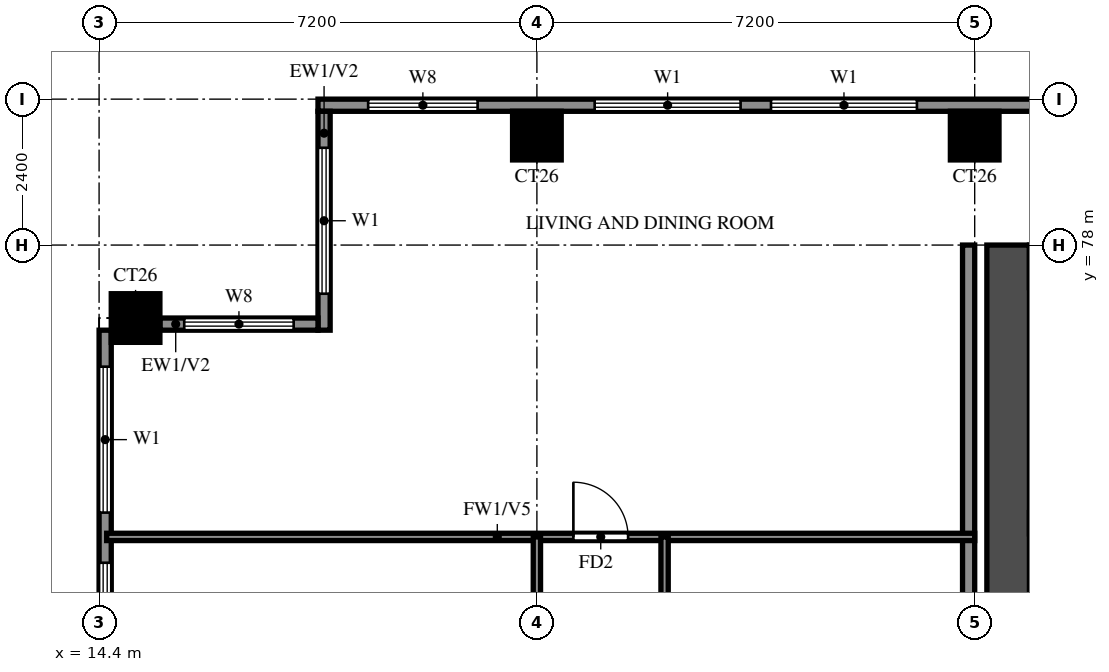
"""IFC4 building model, lengths in metres.
Left out: names, types, materials, properties, quantities, classifications, styles, units other than length and angle.
Written with IfcOpenShell. Run it as: python <this file> out.ifc"""

import sys

from ifc_helpers import new_model, si_unit, direction, frame, frame_2d, origin, origin_2d, place, context, subcontext, project, spatial, rectangle, extrude, source, transform, mapped, element, fill, save


model = new_model("IFC4")
c1 = context("Model", 3, precision=1e-05, world=origin(), true_north=direction((0.0, 1.0)))
c2 = subcontext(c1, "Body", "Model", "MODEL_VIEW")
j1 = project(units=[si_unit("LENGTHUNIT", "METRE"), si_unit("PLANEANGLEUNIT", "RADIAN")], contexts=[c1])
p1 = place(None, origin())
s1 = spatial("IfcSite", under=j1, at=p1, CompositionType="ELEMENT")
p2 = place(p1, origin())
s2 = spatial("IfcBuilding", under=s1, at=p2, CompositionType="ELEMENT")
p3 = place(p2, frame((0.0, 0.0, 188.5)))
s3 = spatial("IfcBuildingStorey", under=s2, at=p3, CompositionType="ELEMENT", Elevation=188.5)
m1 = source(origin(), c2, "Body", "SweptSolid", [
    extrude(rectangle(XDim=0.8, YDim=0.8, at=origin_2d()), origin(), (0.0, 0.0, 1.0), 3.2),
])
for number, where, z_axis, x_axis in (
    (1, (15.0, 76.8, 0.0), (0.0, 0.0, 1.0), (1.0, 0.0, 0.0)),
    (2, (21.6, 79.8, 0.0), (0.0, 0.0, 1.0), (1.0, 0.0, 0.0)),
    (3, (28.8, 79.8, 0.0), (0.0, 0.0, 1.0), (1.0, 0.0, 0.0)),
):
    element("IfcColumn", number, at=place(p3, frame(where, z_axis=z_axis, x_axis=x_axis)), inside=s3, PredefinedType="COLUMN", context=c2, shape_type="MappedRepresentation", body=[
        mapped(m1, transform((0.0, 0.0, 0.0))),
    ])
p4 = place(p3, frame((29.35, 66.1, 0.0), z_axis=(0.0, 0.0, 1.0), x_axis=(0.0, 1.0, 0.0)))
e4 = element("IfcWall", 4, at=p4, inside=s3, PredefinedType="SHEAR", context=c2, shape_type="SweptSolid", body=[
    extrude(rectangle(XDim=11.9, YDim=0.7, at=frame_2d((5.95, 0.0))), origin(), (0.0, 0.0, 1.0), 3.2),
])
p5 = place(p3, frame((72.0, 80.3, 0.0), z_axis=(0.0, 0.0, 1.0), x_axis=(-1.0, 0.0, 0.0)))
e5 = element("IfcWall", 5, at=p5, inside=s3, PredefinedType="SOLIDWALL", context=c2, shape_type="SweptSolid", body=[
    extrude(rectangle(XDim=54.0, YDim=0.2, at=frame_2d((27.0, 0.0))), origin(), (0.0, 0.0, 1.0), 3.2),
])
p6 = place(p5, frame((44.15, 0.0, 0.6)))
e6 = element("IfcOpeningElement", 6, at=p6, cuts=e5, PredefinedType="OPENING", context=c2, shape_type="SweptSolid", body=[
    extrude(rectangle(XDim=2.4, YDim=2.4, at=frame_2d((1.2, 1.2))), frame((0.0, 0.11, 0.0), z_axis=(0.0, -1.0, 0.0), x_axis=(1.0, 0.0, 0.0)), (0.0, 0.0, 1.0), 0.22),
])
p7 = place(p5, frame((47.05, 0.0, 0.6)))
e7 = element("IfcOpeningElement", 7, at=p7, cuts=e5, PredefinedType="OPENING", context=c2, shape_type="SweptSolid", body=[
    extrude(rectangle(XDim=2.4, YDim=2.4, at=frame_2d((1.2, 1.2))), frame((0.0, 0.11, 0.0), z_axis=(0.0, -1.0, 0.0), x_axis=(1.0, 0.0, 0.0)), (0.0, 0.0, 1.0), 0.22),
])
p8 = place(p5, frame((51.375, 0.0, 0.6)))
e8 = element("IfcOpeningElement", 8, at=p8, cuts=e5, PredefinedType="OPENING", context=c2, shape_type="SweptSolid", body=[
    extrude(rectangle(XDim=1.8, YDim=2.4, at=frame_2d((0.9, 1.2))), frame((0.0, 0.11, 0.0), z_axis=(0.0, -1.0, 0.0), x_axis=(1.0, 0.0, 0.0)), (0.0, 0.0, 1.0), 0.22),
])
p9 = place(p3, frame((18.1, 80.2, 0.0), z_axis=(0.0, 0.0, 1.0), x_axis=(0.0, -1.0, 0.0)))
e9 = element("IfcWall", 9, at=p9, inside=s3, PredefinedType="SOLIDWALL", context=c2, shape_type="SweptSolid", body=[
    extrude(rectangle(XDim=3.6, YDim=0.2, at=frame_2d((1.8, 0.0))), origin(), (0.0, 0.0, 1.0), 3.2),
])
p10 = place(p9, frame((0.6, 0.0, 0.6)))
e10 = element("IfcOpeningElement", 10, at=p10, cuts=e9, PredefinedType="OPENING", context=c2, shape_type="SweptSolid", body=[
    extrude(rectangle(XDim=2.4, YDim=2.4, at=frame_2d((1.2, 1.2))), frame((0.0, 0.11, 0.0), z_axis=(0.0, -1.0, 0.0), x_axis=(1.0, 0.0, 0.0)), (0.0, 0.0, 1.0), 0.22),
])
p11 = place(p3, frame((18.0, 76.7, 0.0), z_axis=(0.0, 0.0, 1.0), x_axis=(-1.0, 0.0, 0.0)))
e11 = element("IfcWall", 11, at=p11, inside=s3, PredefinedType="SOLIDWALL", context=c2, shape_type="SweptSolid", body=[
    extrude(rectangle(XDim=2.6, YDim=0.2, at=frame_2d((1.3, 0.0))), origin(), (0.0, 0.0, 1.0), 3.2),
])
p12 = place(p11, frame((0.4, 0.0, 0.6)))
e12 = element("IfcOpeningElement", 12, at=p12, cuts=e11, PredefinedType="OPENING", context=c2, shape_type="SweptSolid", body=[
    extrude(rectangle(XDim=1.8, YDim=2.4, at=frame_2d((0.9, 1.2))), frame((0.0, 0.11, 0.0), z_axis=(0.0, -1.0, 0.0), x_axis=(1.0, 0.0, 0.0)), (0.0, 0.0, 1.0), 0.22),
])
p13 = place(p3, frame((14.5, 76.6, 0.0), z_axis=(0.0, 0.0, 1.0), x_axis=(0.0, -1.0, 0.0)))
e13 = element("IfcWall", 13, at=p13, inside=s3, PredefinedType="SOLIDWALL", context=c2, shape_type="SweptSolid", body=[
    extrude(rectangle(XDim=33.4, YDim=0.2, at=frame_2d((16.7, 0.0))), origin(), (0.0, 0.0, 1.0), 3.2),
])
p14 = place(p13, frame((15.1, 0.0, 0.0)))
e14 = element("IfcOpeningElement", 14, at=p14, cuts=e13, PredefinedType="OPENING", context=c2, shape_type="SweptSolid", body=[
    extrude(rectangle(XDim=1.8, YDim=2.4, at=frame_2d((0.9, 1.2))), frame((0.0, 0.11, 0.0), z_axis=(0.0, -1.0, 0.0), x_axis=(1.0, 0.0, 0.0)), (0.0, 0.0, 1.0), 0.22),
])
p15 = place(p13, frame((29.875, 0.0, 0.6)))
e15 = element("IfcOpeningElement", 15, at=p15, cuts=e13, PredefinedType="OPENING", context=c2, shape_type="SweptSolid", body=[
    extrude(rectangle(XDim=2.4, YDim=2.4, at=frame_2d((1.2, 1.2))), frame((0.0, 0.11, 0.0), z_axis=(0.0, -1.0, 0.0), x_axis=(1.0, 0.0, 0.0)), (0.0, 0.0, 1.0), 0.22),
])
p16 = place(p13, frame((25.425, 0.0, 0.6)))
e16 = element("IfcOpeningElement", 16, at=p16, cuts=e13, PredefinedType="OPENING", context=c2, shape_type="SweptSolid", body=[
    extrude(rectangle(XDim=2.4, YDim=2.4, at=frame_2d((1.2, 1.2))), frame((0.0, 0.11, 0.0), z_axis=(0.0, -1.0, 0.0), x_axis=(1.0, 0.0, 0.0)), (0.0, 0.0, 1.0), 0.22),
])
p17 = place(p13, frame((22.175, 0.0, 0.6)))
e17 = element("IfcOpeningElement", 17, at=p17, cuts=e13, PredefinedType="OPENING", context=c2, shape_type="SweptSolid", body=[
    extrude(rectangle(XDim=2.4, YDim=2.4, at=frame_2d((1.2, 1.2))), frame((0.0, 0.11, 0.0), z_axis=(0.0, -1.0, 0.0), x_axis=(1.0, 0.0, 0.0)), (0.0, 0.0, 1.0), 0.22),
])
p18 = place(p13, frame((19.125, 0.0, 0.6)))
e18 = element("IfcOpeningElement", 18, at=p18, cuts=e13, PredefinedType="OPENING", context=c2, shape_type="SweptSolid", body=[
    extrude(rectangle(XDim=1.8, YDim=2.4, at=frame_2d((0.9, 1.2))), frame((0.0, 0.11, 0.0), z_axis=(0.0, -1.0, 0.0), x_axis=(1.0, 0.0, 0.0)), (0.0, 0.0, 1.0), 0.22),
])
p19 = place(p13, frame((10.75, 0.0, 0.6)))
e19 = element("IfcOpeningElement", 19, at=p19, cuts=e13, PredefinedType="OPENING", context=c2, shape_type="SweptSolid", body=[
    extrude(rectangle(XDim=0.9, YDim=2.4, at=frame_2d((0.45, 1.2))), frame((0.0, 0.11, 0.0), z_axis=(0.0, -1.0, 0.0), x_axis=(1.0, 0.0, 0.0)), (0.0, 0.0, 1.0), 0.22),
])
p20 = place(p13, frame((12.525, 0.0, 0.6)))
e20 = element("IfcOpeningElement", 20, at=p20, cuts=e13, PredefinedType="OPENING", context=c2, shape_type="SweptSolid", body=[
    extrude(rectangle(XDim=1.2, YDim=2.4, at=frame_2d((0.6, 1.2))), frame((0.0, 0.11, 0.0), z_axis=(0.0, -1.0, 0.0), x_axis=(1.0, 0.0, 0.0)), (0.0, 0.0, 1.0), 0.22),
])
p21 = place(p13, frame((7.775, 0.0, 0.6)))
e21 = element("IfcOpeningElement", 21, at=p21, cuts=e13, PredefinedType="OPENING", context=c2, shape_type="SweptSolid", body=[
    extrude(rectangle(XDim=2.4, YDim=2.4, at=frame_2d((1.2, 1.2))), frame((0.0, 0.11, 0.0), z_axis=(0.0, -1.0, 0.0), x_axis=(1.0, 0.0, 0.0)), (0.0, 0.0, 1.0), 0.22),
])
p22 = place(p13, frame((3.825, 0.0, 0.6)))
e22 = element("IfcOpeningElement", 22, at=p22, cuts=e13, PredefinedType="OPENING", context=c2, shape_type="SweptSolid", body=[
    extrude(rectangle(XDim=2.4, YDim=2.4, at=frame_2d((1.2, 1.2))), frame((0.0, 0.11, 0.0), z_axis=(0.0, -1.0, 0.0), x_axis=(1.0, 0.0, 0.0)), (0.0, 0.0, 1.0), 0.22),
])
p23 = place(p13, frame((0.6, 0.0, 0.6)))
e23 = element("IfcOpeningElement", 23, at=p23, cuts=e13, PredefinedType="OPENING", context=c2, shape_type="SweptSolid", body=[
    extrude(rectangle(XDim=2.4, YDim=2.4, at=frame_2d((1.2, 1.2))), frame((0.0, 0.11, 0.0), z_axis=(0.0, -1.0, 0.0), x_axis=(1.0, 0.0, 0.0)), (0.0, 0.0, 1.0), 0.22),
])
p24 = place(p3, frame((28.7, 62.4, 0.0), z_axis=(0.0, 0.0, 1.0), x_axis=(0.0, 1.0, 0.0)))
e24 = element("IfcWall", 24, at=p24, inside=s3, PredefinedType="SOLIDWALL", context=c2, shape_type="SweptSolid", body=[
    extrude(rectangle(XDim=15.6, YDim=0.2, at=frame_2d((7.8, 0.0))), origin(), (0.0, 0.0, 1.0), 3.2),
])
p25 = place(p3, frame((14.525, 73.2, 0.0), z_axis=(0.0, 0.0, 1.0), x_axis=(1.0, 0.0, 0.0)))
e25 = element("IfcWall", 25, at=p25, inside=s3, PredefinedType="PARTITIONING", context=c2, shape_type="SweptSolid", body=[
    extrude(rectangle(XDim=14.275, YDim=0.12, at=frame_2d((7.138, 0.0))), origin(), (0.0, 0.0, 1.0), 2.3),
])
p26 = place(p25, frame((7.675, 0.0, 0.0)))
e26 = element("IfcOpeningElement", 26, at=p26, cuts=e25, PredefinedType="OPENING", context=c2, shape_type="SweptSolid", body=[
    extrude(rectangle(XDim=0.9, YDim=2.1, at=frame_2d((0.45, 1.05))), frame((0.0, 0.07, 0.0), z_axis=(0.0, -1.0, 0.0), x_axis=(1.0, 0.0, 0.0)), (0.0, 0.0, 1.0), 0.14),
])
p27 = place(p3, frame((21.6, 48.0, 0.0), z_axis=(0.0, 0.0, 1.0), x_axis=(0.0, 1.0, 0.0)))
e27 = element("IfcWall", 27, at=p27, inside=s3, PredefinedType="PARTITIONING", context=c2, shape_type="SweptSolid", body=[
    extrude(rectangle(XDim=25.2, YDim=0.12, at=frame_2d((12.6, 0.0))), origin(), (0.0, 0.0, 1.0), 3.2),
])
p28 = place(p27, frame((1.35, 0.0, 0.0)))
e28 = element("IfcOpeningElement", 28, at=p28, cuts=e27, PredefinedType="OPENING", context=c2, shape_type="SweptSolid", body=[
    extrude(rectangle(XDim=0.9, YDim=2.1, at=frame_2d((0.45, 1.05))), frame((0.0, 0.07, 0.0), z_axis=(0.0, -1.0, 0.0), x_axis=(1.0, 0.0, 0.0)), (0.0, 0.0, 1.0), 0.14),
])
p29 = place(p27, frame((4.95, 0.0, 0.0)))
e29 = element("IfcOpeningElement", 29, at=p29, cuts=e27, PredefinedType="OPENING", context=c2, shape_type="SweptSolid", body=[
    extrude(rectangle(XDim=0.9, YDim=2.1, at=frame_2d((0.45, 1.05))), frame((0.0, 0.07, 0.0), z_axis=(0.0, -1.0, 0.0), x_axis=(1.0, 0.0, 0.0)), (0.0, 0.0, 1.0), 0.14),
])
p30 = place(p27, frame((8.25, 0.0, 0.0)))
e30 = element("IfcOpeningElement", 30, at=p30, cuts=e27, PredefinedType="OPENING", context=c2, shape_type="SweptSolid", body=[
    extrude(rectangle(XDim=1.5, YDim=2.1, at=frame_2d((0.75, 1.05))), frame((0.0, 0.07, 0.0), z_axis=(0.0, -1.0, 0.0), x_axis=(1.0, 0.0, 0.0)), (0.0, 0.0, 1.0), 0.14),
])
p31 = place(p27, frame((12.15, 0.0, 0.0)))
e31 = element("IfcOpeningElement", 31, at=p31, cuts=e27, PredefinedType="OPENING", context=c2, shape_type="SweptSolid", body=[
    extrude(rectangle(XDim=0.9, YDim=2.1, at=frame_2d((0.45, 1.05))), frame((0.0, 0.07, 0.0), z_axis=(0.0, -1.0, 0.0), x_axis=(1.0, 0.0, 0.0)), (0.0, 0.0, 1.0), 0.14),
])
p32 = place(p27, frame((15.75, 0.0, 0.0)))
e32 = element("IfcOpeningElement", 32, at=p32, cuts=e27, PredefinedType="OPENING", context=c2, shape_type="SweptSolid", body=[
    extrude(rectangle(XDim=0.9, YDim=2.1, at=frame_2d((0.45, 1.05))), frame((0.0, 0.07, 0.0), z_axis=(0.0, -1.0, 0.0), x_axis=(1.0, 0.0, 0.0)), (0.0, 0.0, 1.0), 0.14),
])
p33 = place(p27, frame((19.35, 0.0, 0.0)))
e33 = element("IfcOpeningElement", 33, at=p33, cuts=e27, PredefinedType="OPENING", context=c2, shape_type="SweptSolid", body=[
    extrude(rectangle(XDim=0.9, YDim=2.1, at=frame_2d((0.45, 1.05))), frame((0.0, 0.07, 0.0), z_axis=(0.0, -1.0, 0.0), x_axis=(1.0, 0.0, 0.0)), (0.0, 0.0, 1.0), 0.14),
])
p34 = place(p27, frame((22.95, 0.0, 0.0)))
e34 = element("IfcOpeningElement", 34, at=p34, cuts=e27, PredefinedType="OPENING", context=c2, shape_type="SweptSolid", body=[
    extrude(rectangle(XDim=0.9, YDim=2.1, at=frame_2d((0.45, 1.05))), frame((0.0, 0.07, 0.0), z_axis=(0.0, -1.0, 0.0), x_axis=(1.0, 0.0, 0.0)), (0.0, 0.0, 1.0), 0.14),
])
p35 = place(p3, frame((23.7, 61.2, 0.0), z_axis=(0.0, 0.0, 1.0), x_axis=(0.0, 1.0, 0.0)))
e35 = element("IfcWall", 35, at=p35, inside=s3, PredefinedType="PARTITIONING", context=c2, shape_type="SweptSolid", body=[
    extrude(rectangle(XDim=12.0, YDim=0.12, at=frame_2d((6.0, 0.0))), origin(), (0.0, 0.0, 1.0), 3.2),
])
p36 = place(p35, frame((5.5, 0.0, 0.0)))
e36 = element("IfcOpeningElement", 36, at=p36, cuts=e35, PredefinedType="OPENING", context=c2, shape_type="SweptSolid", body=[
    extrude(rectangle(XDim=0.8, YDim=2.1, at=frame_2d((0.4, 1.05))), frame((0.0, 0.07, 0.0), z_axis=(0.0, -1.0, 0.0), x_axis=(1.0, 0.0, 0.0)), (0.0, 0.0, 1.0), 0.14),
])
p37 = place(p35, frame((9.125, 0.0, 0.0)))
e37 = element("IfcOpeningElement", 37, at=p37, cuts=e35, PredefinedType="OPENING", context=c2, shape_type="SweptSolid", body=[
    extrude(rectangle(XDim=0.9, YDim=2.1, at=frame_2d((0.45, 1.05))), frame((0.0, 0.07, 0.0), z_axis=(0.0, -1.0, 0.0), x_axis=(1.0, 0.0, 0.0)), (0.0, 0.0, 1.0), 0.14),
])
p38 = place(p6, origin())
e38 = element("IfcWindow", 38, at=p38, inside=s3, PartitioningType="DOUBLE_PANEL_VERTICAL", PredefinedType="WINDOW", context=c2, shape_type="SweptSolid", body=[
    extrude(rectangle(XDim=2.4, YDim=2.4, at=frame_2d((1.2, 1.2))), frame((0.0, 0.03, 0.0), z_axis=(0.0, -1.0, 0.0), x_axis=(1.0, 0.0, 0.0)), (0.0, 0.0, 1.0), 0.06),
])
fill(e6, e38)
p39 = place(p7, origin())
e39 = element("IfcWindow", 39, at=p39, inside=s3, PartitioningType="DOUBLE_PANEL_VERTICAL", PredefinedType="WINDOW", context=c2, shape_type="SweptSolid", body=[
    extrude(rectangle(XDim=2.4, YDim=2.4, at=frame_2d((1.2, 1.2))), frame((0.0, 0.03, 0.0), z_axis=(0.0, -1.0, 0.0), x_axis=(1.0, 0.0, 0.0)), (0.0, 0.0, 1.0), 0.06),
])
fill(e7, e39)
p40 = place(p8, origin())
e40 = element("IfcWindow", 40, at=p40, inside=s3, PartitioningType="DOUBLE_PANEL_VERTICAL", PredefinedType="WINDOW", context=c2, shape_type="SweptSolid", body=[
    extrude(rectangle(XDim=1.8, YDim=2.4, at=frame_2d((0.9, 1.2))), frame((0.0, 0.03, 0.0), z_axis=(0.0, -1.0, 0.0), x_axis=(1.0, 0.0, 0.0)), (0.0, 0.0, 1.0), 0.06),
])
fill(e8, e40)
p41 = place(p10, origin())
e41 = element("IfcWindow", 41, at=p41, inside=s3, PartitioningType="DOUBLE_PANEL_VERTICAL", PredefinedType="WINDOW", context=c2, shape_type="SweptSolid", body=[
    extrude(rectangle(XDim=2.4, YDim=2.4, at=frame_2d((1.2, 1.2))), frame((0.0, 0.03, 0.0), z_axis=(0.0, -1.0, 0.0), x_axis=(1.0, 0.0, 0.0)), (0.0, 0.0, 1.0), 0.06),
])
fill(e10, e41)
p42 = place(p12, origin())
e42 = element("IfcWindow", 42, at=p42, inside=s3, PartitioningType="DOUBLE_PANEL_VERTICAL", PredefinedType="WINDOW", context=c2, shape_type="SweptSolid", body=[
    extrude(rectangle(XDim=1.8, YDim=2.4, at=frame_2d((0.9, 1.2))), frame((0.0, 0.03, 0.0), z_axis=(0.0, -1.0, 0.0), x_axis=(1.0, 0.0, 0.0)), (0.0, 0.0, 1.0), 0.06),
])
fill(e12, e42)
p43 = place(p22, origin())
e43 = element("IfcWindow", 43, at=p43, inside=s3, PartitioningType="DOUBLE_PANEL_VERTICAL", PredefinedType="WINDOW", context=c2, shape_type="SweptSolid", body=[
    extrude(rectangle(XDim=2.4, YDim=2.4, at=frame_2d((1.2, 1.2))), frame((0.0, 0.03, 0.0), z_axis=(0.0, -1.0, 0.0), x_axis=(1.0, 0.0, 0.0)), (0.0, 0.0, 1.0), 0.06),
])
fill(e22, e43)
p44 = place(p23, origin())
e44 = element("IfcWindow", 44, at=p44, inside=s3, PartitioningType="DOUBLE_PANEL_VERTICAL", PredefinedType="WINDOW", context=c2, shape_type="SweptSolid", body=[
    extrude(rectangle(XDim=2.4, YDim=2.4, at=frame_2d((1.2, 1.2))), frame((0.0, 0.03, 0.0), z_axis=(0.0, -1.0, 0.0), x_axis=(1.0, 0.0, 0.0)), (0.0, 0.0, 1.0), 0.06),
])
fill(e23, e44)
p45 = place(p26, origin())
e45 = element("IfcDoor", 45, at=p45, inside=s3, OperationType="SINGLE_SWING_LEFT", PredefinedType="DOOR", context=c2, shape_type="SweptSolid", body=[
    extrude(rectangle(XDim=0.9, YDim=2.1, at=frame_2d((0.45, 1.05))), frame((0.0, 0.025, 0.0), z_axis=(0.0, -1.0, 0.0), x_axis=(1.0, 0.0, 0.0)), (0.0, 0.0, 1.0), 0.05),
])
fill(e26, e45)
save(model, sys.argv[1])
